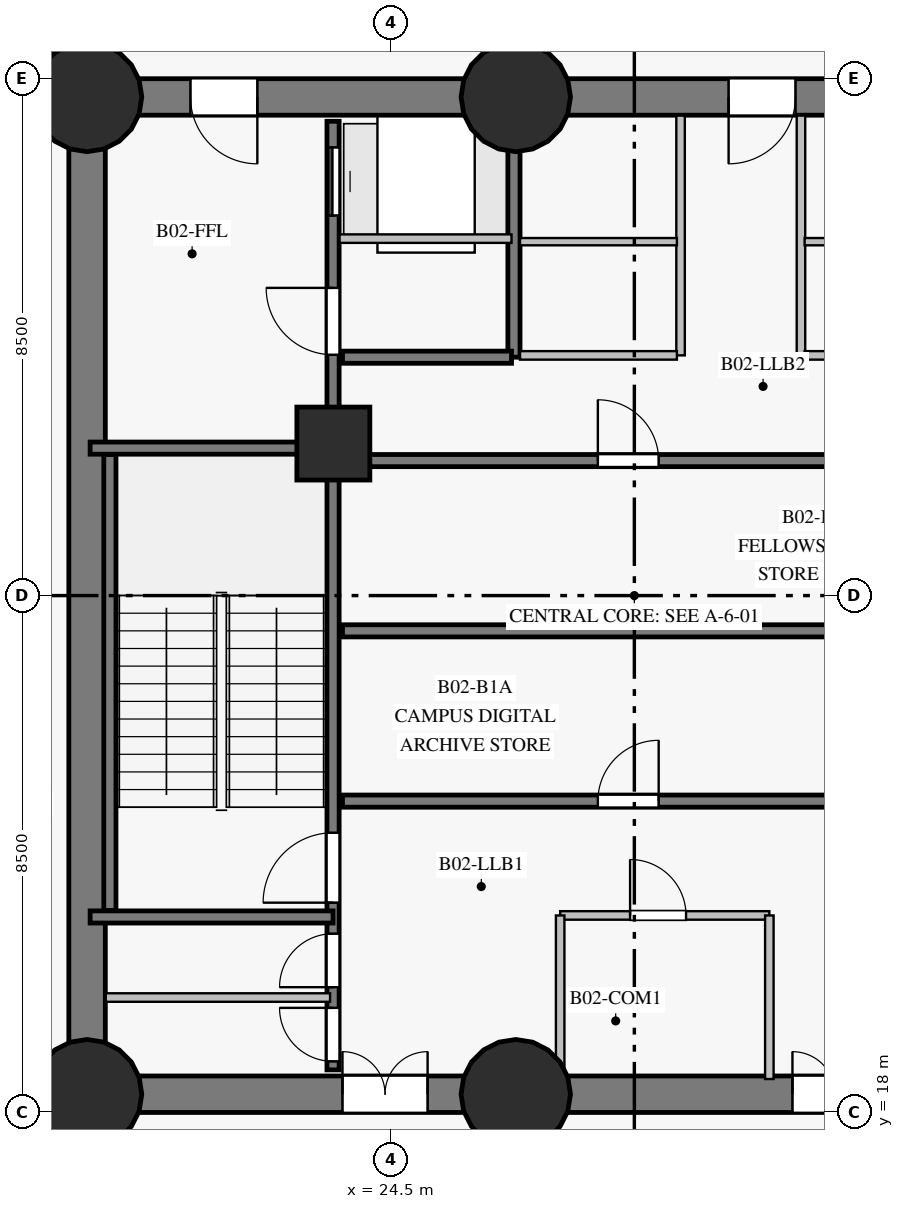
"""IFC4 building model, lengths in metres.
Left out: names, types, materials, properties, quantities, classifications, styles, units other than length and angle.
Written with IfcOpenShell. Run it as: python <this file> out.ifc"""

import sys

from ifc_helpers import new_model, si_unit, direction, frame, frame_2d, origin, origin_with_axes, origin_2d, place, context, subcontext, project, spatial, rectangle, circle, extrude, source, transform, mapped, element, fill, save


model = new_model("IFC4")
c1 = context("Model", 3, precision=1e-05, world=origin(), true_north=direction((0.0, 1.0)))
c2 = subcontext(c1, "Body", "Model", "MODEL_VIEW")
j1 = project(units=[si_unit("LENGTHUNIT", "METRE"), si_unit("PLANEANGLEUNIT", "RADIAN")], contexts=[c1])
p1 = place(None, origin())
s1 = spatial("IfcSite", under=j1, at=p1, CompositionType="ELEMENT")
p2 = place(p1, origin())
s2 = spatial("IfcBuilding", under=s1, at=p2, CompositionType="ELEMENT")
p3 = place(p2, frame((0.0, 0.0, -8.4)))
s3 = spatial("IfcBuildingStorey", under=s2, at=p3, CompositionType="ELEMENT", Elevation=-8.4)
p4 = place(p3, frame((19.5, 18.3, 0.0), z_axis=(0.0, 0.0, 1.0), x_axis=(1.0, 0.0, 0.0)))
e1 = element("IfcWall", 1, at=p4, inside=s3, PredefinedType="SHEAR", context=c2, shape_type="SweptSolid", body=[
    extrude(rectangle(XDim=7.05, YDim=0.6, at=frame_2d((3.525, 0.0))), origin(), (0.0, 0.0, 1.0), 3.85),
])
p5 = place(p4, frame((4.2, 0.0, 0.0)))
e2 = element("IfcOpeningElement", 2, at=p5, cuts=e1, PredefinedType="OPENING", context=c2, shape_type="SweptSolid", body=[
    extrude(rectangle(XDim=1.4, YDim=2.2, at=frame_2d((0.7, 1.1))), frame((0.0, 0.31, 0.0), z_axis=(0.0, -1.0, 0.0), x_axis=(1.0, 0.0, 0.0)), (0.0, 0.0, 1.0), 0.62),
])
p6 = place(p3, frame((26.55, 18.3, 0.0), z_axis=(0.0, 0.0, 1.0), x_axis=(1.0, 0.0, 0.0)))
e3 = element("IfcWall", 3, at=p6, inside=s3, PredefinedType="SHEAR", context=c2, shape_type="SweptSolid", body=[
    extrude(rectangle(XDim=10.95, YDim=0.6, at=frame_2d((5.475, 0.0))), origin(), (0.0, 0.0, 1.0), 3.85),
])
p7 = place(p6, frame((4.55, 0.0, 0.0)))
e4 = element("IfcOpeningElement", 4, at=p7, cuts=e3, PredefinedType="OPENING", context=c2, shape_type="SweptSolid", body=[
    extrude(rectangle(XDim=1.4, YDim=2.2, at=frame_2d((0.7, 1.1))), frame((0.0, 0.31, 0.0), z_axis=(0.0, -1.0, 0.0), x_axis=(1.0, 0.0, 0.0)), (0.0, 0.0, 1.0), 0.62),
])
p8 = place(p3, frame((37.5, 34.7, 0.0), z_axis=(0.0, 0.0, 1.0), x_axis=(-1.0, 0.0, 0.0)))
e5 = element("IfcWall", 5, at=p8, inside=s3, PredefinedType="SHEAR", context=c2, shape_type="SweptSolid", body=[
    extrude(rectangle(XDim=10.95, YDim=0.6, at=frame_2d((5.475, 0.0))), origin(), (0.0, 0.0, 1.0), 3.85),
])
p9 = place(p8, frame((2.15, 0.0, 0.0)))
e6 = element("IfcOpeningElement", 6, at=p9, cuts=e5, PredefinedType="OPENING", context=c2, shape_type="SweptSolid", body=[
    extrude(rectangle(XDim=1.2, YDim=2.15, at=frame_2d((0.6, 1.075))), frame((0.0, 0.31, 0.0), z_axis=(0.0, -1.0, 0.0), x_axis=(1.0, 0.0, 0.0)), (0.0, 0.0, 1.0), 0.62),
])
p10 = place(p8, frame((6.35, 0.0, 0.0)))
e7 = element("IfcOpeningElement", 7, at=p10, cuts=e5, PredefinedType="OPENING", context=c2, shape_type="SweptSolid", body=[
    extrude(rectangle(XDim=1.1, YDim=2.15, at=frame_2d((0.55, 1.075))), frame((0.0, 0.31, 0.0), z_axis=(0.0, -1.0, 0.0), x_axis=(1.0, 0.0, 0.0)), (0.0, 0.0, 1.0), 0.62),
])
p11 = place(p3, frame((26.55, 34.7, 0.0), z_axis=(0.0, 0.0, 1.0), x_axis=(-1.0, 0.0, 0.0)))
e8 = element("IfcWall", 8, at=p11, inside=s3, PredefinedType="SHEAR", context=c2, shape_type="SweptSolid", body=[
    extrude(rectangle(XDim=7.05, YDim=0.6, at=frame_2d((3.525, 0.0))), origin(), (0.0, 0.0, 1.0), 3.85),
])
p12 = place(p11, frame((4.25, 0.0, 0.0)))
e9 = element("IfcOpeningElement", 9, at=p12, cuts=e8, PredefinedType="OPENING", context=c2, shape_type="SweptSolid", body=[
    extrude(rectangle(XDim=1.1, YDim=2.15, at=frame_2d((0.55, 1.075))), frame((0.0, 0.31, 0.0), z_axis=(0.0, -1.0, 0.0), x_axis=(1.0, 0.0, 0.0)), (0.0, 0.0, 1.0), 0.62),
])
p13 = place(p3, frame((19.5, 34.7, 0.0), z_axis=(0.0, 0.0, 1.0), x_axis=(0.0, -1.0, 0.0)))
e10 = element("IfcWall", 10, at=p13, inside=s3, PredefinedType="SHEAR", context=c2, shape_type="SweptSolid", body=[
    extrude(rectangle(XDim=16.4, YDim=0.6, at=frame_2d((8.2, 0.0))), origin(), (0.0, 0.0, 1.0), 3.85),
])
m1 = source(origin_with_axes(), c2, "Body", "SweptSolid", [
    extrude(circle(Radius=0.9, at=origin_2d()), origin(), (0.0, 0.0, 1.0), 4.2),
])
for number, where, z_axis, x_axis in (
    (11, (19.5, 18.3, 0.0), (0.0, 0.0, 1.0), (1.0, 0.0, 0.0)),
    (12, (26.55, 18.3, 0.0), (0.0, 0.0, 1.0), (1.0, 0.0, 0.0)),
    (13, (19.5, 34.7, 0.0), (0.0, 0.0, 1.0), (1.0, 0.0, 0.0)),
    (14, (26.55, 34.7, 0.0), (0.0, 0.0, 1.0), (1.0, 0.0, 0.0)),
):
    element("IfcColumn", number, at=place(p3, frame(where, z_axis=z_axis, x_axis=x_axis)), inside=s3, PredefinedType="COLUMN", context=c2, shape_type="MappedRepresentation", body=[
        mapped(m1, transform((0.0, 0.0, 0.0), scale=1.0)),
    ])
m2 = source(origin_with_axes(), c2, "Body", "SweptSolid", [
    extrude(rectangle(XDim=1.2, YDim=1.2, at=origin_2d()), origin(), (0.0, 0.0, 1.0), 4.2),
])
p14 = place(p3, frame((23.55, 29.0, 0.0), z_axis=(0.0, 0.0, 1.0), x_axis=(1.0, 0.0, 0.0)))
e15 = element("IfcColumn", 15, at=p14, inside=s3, PredefinedType="COLUMN", context=c2, shape_type="MappedRepresentation", body=[
    mapped(m2, transform((0.0, 0.0, 0.0), scale=1.0)),
])
p15 = place(p3, frame((23.545, 18.7, 0.0), z_axis=(0.0, 0.0, 1.0), x_axis=(0.0, 1.0, 0.0)))
e16 = element("IfcWall", 16, at=p15, inside=s3, PredefinedType="SHEAR", context=c2, shape_type="SweptSolid", body=[
    extrude(rectangle(XDim=15.6, YDim=0.2, at=frame_2d((7.8, 0.0))), origin(), (0.0, 0.0, 1.0), 3.85),
])
p16 = place(p15, frame((2.75, 0.0, 0.0)))
e17 = element("IfcOpeningElement", 17, at=p16, cuts=e16, PredefinedType="OPENING", context=c2, shape_type="SweptSolid", body=[
    extrude(rectangle(XDim=1.15, YDim=2.15, at=frame_2d((0.575, 1.075))), frame((0.0, 0.11, 0.0), z_axis=(0.0, -1.0, 0.0), x_axis=(1.0, 0.0, 0.0)), (0.0, 0.0, 1.0), 0.22),
])
p17 = place(p15, frame((11.76, 0.0, 0.0)))
e18 = element("IfcOpeningElement", 18, at=p17, cuts=e16, PredefinedType="OPENING", context=c2, shape_type="SweptSolid", body=[
    extrude(rectangle(XDim=1.1, YDim=2.15, at=frame_2d((0.55, 1.075))), frame((0.0, 0.11, 0.0), z_axis=(0.0, -1.0, 0.0), x_axis=(1.0, 0.0, 0.0)), (0.0, 0.0, 1.0), 0.22),
])
p18 = place(p15, frame((0.14, 0.0, 0.0)))
e19 = element("IfcOpeningElement", 19, at=p18, cuts=e16, PredefinedType="OPENING", context=c2, shape_type="SweptSolid", body=[
    extrude(rectangle(XDim=0.88, YDim=2.1, at=frame_2d((0.44, 1.05))), frame((0.0, 0.11, 0.0), z_axis=(0.0, -1.0, 0.0), x_axis=(1.0, 0.0, 0.0)), (0.0, 0.0, 1.0), 0.22),
])
p19 = place(p15, frame((1.36, 0.0, 0.0)))
e20 = element("IfcOpeningElement", 20, at=p19, cuts=e16, PredefinedType="OPENING", context=c2, shape_type="SweptSolid", body=[
    extrude(rectangle(XDim=0.88, YDim=2.1, at=frame_2d((0.44, 1.05))), frame((0.0, 0.11, 0.0), z_axis=(0.0, -1.0, 0.0), x_axis=(1.0, 0.0, 0.0)), (0.0, 0.0, 1.0), 0.22),
])
p20 = place(p15, frame((14.05, 0.0, 0.0)))
e21 = element("IfcOpeningElement", 21, at=p20, cuts=e16, PredefinedType="OPENING", context=c2, shape_type="SweptSolid", body=[
    extrude(rectangle(XDim=1.12, YDim=2.15, at=frame_2d((0.56, 1.075))), frame((0.0, 0.11, 0.0), z_axis=(0.0, -1.0, 0.0), x_axis=(1.0, 0.0, 0.0)), (0.0, 0.0, 1.0), 0.22),
])
p21 = place(p3, frame((23.7, 23.12, 0.0), z_axis=(0.0, 0.0, 1.0), x_axis=(1.0, 0.0, 0.0)))
e22 = element("IfcWall", 22, at=p21, inside=s3, PredefinedType="SHEAR", context=c2, shape_type="SweptSolid", body=[
    extrude(rectangle(XDim=9.6, YDim=0.2, at=frame_2d((4.8, 0.0))), origin(), (0.0, 0.0, 1.0), 3.85),
])
p22 = place(p21, frame((4.2, 0.0, 0.0)))
e23 = element("IfcOpeningElement", 23, at=p22, cuts=e22, PredefinedType="OPENING", context=c2, shape_type="SweptSolid", body=[
    extrude(rectangle(XDim=1.0, YDim=2.15, at=frame_2d((0.5, 1.075))), frame((0.0, 0.11, 0.0), z_axis=(0.0, -1.0, 0.0), x_axis=(1.0, 0.0, 0.0)), (0.0, 0.0, 1.0), 0.22),
])
p23 = place(p3, frame((23.7, 25.92, 0.0), z_axis=(0.0, 0.0, 1.0), x_axis=(1.0, 0.0, 0.0)))
e24 = element("IfcWall", 24, at=p23, inside=s3, PredefinedType="SHEAR", context=c2, shape_type="SweptSolid", body=[
    extrude(rectangle(XDim=9.6, YDim=0.2, at=frame_2d((4.8, 0.0))), origin(), (0.0, 0.0, 1.0), 3.85),
])
p24 = place(p3, frame((23.7, 28.72, 0.0), z_axis=(0.0, 0.0, 1.0), x_axis=(1.0, 0.0, 0.0)))
e25 = element("IfcWall", 25, at=p24, inside=s3, PredefinedType="SHEAR", context=c2, shape_type="SweptSolid", body=[
    extrude(rectangle(XDim=9.6, YDim=0.2, at=frame_2d((4.8, 0.0))), origin(), (0.0, 0.0, 1.0), 3.85),
])
p25 = place(p24, frame((4.2, 0.0, 0.0)))
e26 = element("IfcOpeningElement", 26, at=p25, cuts=e25, PredefinedType="OPENING", context=c2, shape_type="SweptSolid", body=[
    extrude(rectangle(XDim=1.0, YDim=2.15, at=frame_2d((0.5, 1.075))), frame((0.0, 0.11, 0.0), z_axis=(0.0, -1.0, 0.0), x_axis=(1.0, 0.0, 0.0)), (0.0, 0.0, 1.0), 0.22),
])
p26 = place(p3, frame((19.875, 21.32, 0.0), z_axis=(0.0, 0.0, 1.0), x_axis=(0.0, 1.0, 0.0)))
e27 = element("IfcWall", 27, at=p26, inside=s3, PredefinedType="SHEAR", context=c2, shape_type="SweptSolid", body=[
    extrude(rectangle(XDim=7.5, YDim=0.2, at=frame_2d((3.75, 0.0))), origin(), (0.0, 0.0, 1.0), 3.85),
])
for number, where, z_axis, x_axis in (
    (28, (19.55, 21.215, 0.0), (0.0, 0.0, 1.0), (1.0, 0.0, 0.0)),
    (29, (19.55, 28.925, 0.0), (0.0, 0.0, 1.0), (1.0, 0.0, 0.0)),
):
    element("IfcWall", number, at=place(p3, frame(where, z_axis=z_axis, x_axis=x_axis)), inside=s3, PredefinedType="SHEAR", context=c2, shape_type="SweptSolid", body=[
        extrude(rectangle(XDim=3.995, YDim=0.2, at=frame_2d((1.998, 0.0))), origin(), (0.0, 0.0, 1.0), 3.85),
    ])
p27 = place(p3, frame((26.52, 30.42, 0.0), z_axis=(0.0, 0.0, 1.0), x_axis=(0.0, 1.0, 0.0)))
e30 = element("IfcWall", 30, at=p27, inside=s3, PredefinedType="SHEAR", context=c2, shape_type="SweptSolid", body=[
    extrude(rectangle(XDim=3.86, YDim=0.2, at=frame_2d((1.93, 0.0))), origin(), (0.0, 0.0, 1.0), 3.85),
])
p28 = place(p3, frame((23.7, 30.42, 0.0), z_axis=(0.0, 0.0, 1.0), x_axis=(1.0, 0.0, 0.0)))
e31 = element("IfcWall", 31, at=p28, inside=s3, PredefinedType="SHEAR", context=c2, shape_type="SweptSolid", body=[
    extrude(rectangle(XDim=2.78, YDim=0.2, at=frame_2d((1.39, 0.0))), origin(), (0.0, 0.0, 1.0), 3.85),
])
for number, where, z_axis, x_axis in (
    (32, (29.26, 30.45, 0.0), (0.0, 0.0, 1.0), (0.0, 1.0, 0.0)),
    (33, (31.24, 30.45, 0.0), (0.0, 0.0, 1.0), (0.0, 1.0, 0.0)),
):
    element("IfcWall", number, at=place(p3, frame(where, z_axis=z_axis, x_axis=x_axis)), inside=s3, PredefinedType="PARTITIONING", context=c2, shape_type="SweptSolid", body=[
        extrude(rectangle(XDim=3.943, YDim=0.14, at=frame_2d((1.972, 0.0))), origin(), (0.0, 0.0, 1.0), 3.85),
    ])
p29 = place(p3, frame((19.807, 19.89, 0.0), z_axis=(0.0, 0.0, 1.0), x_axis=(1.0, 0.0, 0.0)))
e34 = element("IfcWall", 34, at=p29, inside=s3, PredefinedType="PARTITIONING", context=c2, shape_type="SweptSolid", body=[
    extrude(rectangle(XDim=3.689, YDim=0.14, at=frame_2d((1.844, 0.0))), origin(), (0.0, 0.0, 1.0), 3.85),
])
p30 = place(p3, frame((27.28, 21.24, 0.0), z_axis=(0.0, 0.0, 1.0), x_axis=(1.0, 0.0, 0.0)))
e35 = element("IfcWall", 35, at=p30, inside=s3, PredefinedType="PARTITIONING", context=c2, shape_type="SweptSolid", body=[
    extrude(rectangle(XDim=3.44, YDim=0.14, at=frame_2d((1.72, 0.0))), origin(), (0.0, 0.0, 1.0), 3.85),
])
p31 = place(p30, frame((1.15, 0.0, 0.0)))
e36 = element("IfcOpeningElement", 36, at=p31, cuts=e35, PredefinedType="OPENING", context=c2, shape_type="SweptSolid", body=[
    extrude(rectangle(XDim=0.92, YDim=2.1, at=frame_2d((0.46, 1.05))), frame((0.0, 0.08, 0.0), z_axis=(0.0, -1.0, 0.0), x_axis=(1.0, 0.0, 0.0)), (0.0, 0.0, 1.0), 0.16),
])
p32 = place(p3, frame((23.652, 32.37, 0.0), z_axis=(0.0, 0.0, 1.0), x_axis=(1.0, 0.0, 0.0)))
e37 = element("IfcWall", 37, at=p32, inside=s3, PredefinedType="PARTITIONING", context=c2, shape_type="SweptSolid", body=[
    extrude(rectangle(XDim=2.828, YDim=0.14, at=frame_2d((1.414, 0.0))), origin(), (0.0, 0.0, 1.0), 3.85),
])
for number, where, z_axis, x_axis in (
    (38, (27.28, 18.55, 0.0), (0.0, 0.0, 1.0), (0.0, 1.0, 0.0)),
    (39, (30.72, 18.55, 0.0), (0.0, 0.0, 1.0), (0.0, 1.0, 0.0)),
):
    element("IfcWall", number, at=place(p3, frame(where, z_axis=z_axis, x_axis=x_axis)), inside=s3, PredefinedType="PARTITIONING", context=c2, shape_type="SweptSolid", body=[
        extrude(rectangle(XDim=2.69, YDim=0.14, at=frame_2d((1.345, 0.0))), origin(), (0.0, 0.0, 1.0), 3.85),
    ])
p33 = place(p3, frame((26.62, 30.45, 0.0), z_axis=(0.0, 0.0, 1.0), x_axis=(1.0, 0.0, 0.0)))
e40 = element("IfcWall", 40, at=p33, inside=s3, PredefinedType="PARTITIONING", context=c2, shape_type="SweptSolid", body=[
    extrude(rectangle(XDim=2.58, YDim=0.14, at=frame_2d((1.29, 0.0))), origin(), (0.0, 0.0, 1.0), 3.85),
])
p34 = place(p3, frame((26.62, 32.32, 0.0), z_axis=(0.0, 0.0, 1.0), x_axis=(1.0, 0.0, 0.0)))
e41 = element("IfcWall", 41, at=p34, inside=s3, PredefinedType="PARTITIONING", context=c2, shape_type="SweptSolid", body=[
    extrude(rectangle(XDim=2.58, YDim=0.12, at=frame_2d((1.29, 0.0))), origin(), (0.0, 0.0, 1.0), 3.85),
])
p35 = place(p3, frame((31.3, 30.45, 0.0), z_axis=(0.0, 0.0, 1.0), x_axis=(1.0, 0.0, 0.0)))
e42 = element("IfcWall", 42, at=p35, inside=s3, PredefinedType="PARTITIONING", context=c2, shape_type="SweptSolid", body=[
    extrude(rectangle(XDim=2.075, YDim=0.14, at=frame_2d((1.038, 0.0))), origin(), (0.0, 0.0, 1.0), 3.85),
])
p36 = place(p3, frame((31.3, 32.32, 0.0), z_axis=(0.0, 0.0, 1.0), x_axis=(1.0, 0.0, 0.0)))
e43 = element("IfcWall", 43, at=p36, inside=s3, PredefinedType="PARTITIONING", context=c2, shape_type="SweptSolid", body=[
    extrude(rectangle(XDim=2.075, YDim=0.12, at=frame_2d((1.038, 0.0))), origin(), (0.0, 0.0, 1.0), 3.85),
])
m3 = source(origin_with_axes(), c2, "Body", "SweptSolid", [
    extrude(rectangle(XDim=1.15, YDim=2.15, at=frame_2d((0.575, 1.075))), frame((0.0, 0.025, 0.0), z_axis=(0.0, -1.0, 0.0), x_axis=(1.0, 0.0, 0.0)), (0.0, 0.0, 1.0), 0.05),
])
p37 = place(p16, origin())
e44 = element("IfcDoor", 44, at=p37, inside=s3, OperationType="SINGLE_SWING_LEFT", PredefinedType="DOOR", context=c2, shape_type="MappedRepresentation", body=[
    mapped(m3, transform((0.0, 0.0, 0.0), scale=1.0)),
])
fill(e17, e44)
m4 = source(origin_with_axes(), c2, "Body", "SweptSolid", [
    extrude(rectangle(XDim=1.1, YDim=2.15, at=frame_2d((0.55, 1.075))), frame((0.0, 0.025, 0.0), z_axis=(0.0, -1.0, 0.0), x_axis=(1.0, 0.0, 0.0)), (0.0, 0.0, 1.0), 0.05),
])
p38 = place(p12, origin())
e45 = element("IfcDoor", 45, at=p38, inside=s3, OperationType="SINGLE_SWING_LEFT", PredefinedType="DOOR", context=c2, shape_type="MappedRepresentation", body=[
    mapped(m4, transform((0.0, 0.0, 0.0), scale=1.0)),
])
fill(e9, e45)
p39 = place(p17, origin())
e46 = element("IfcDoor", 46, at=p39, inside=s3, OperationType="SINGLE_SWING_RIGHT", PredefinedType="DOOR", context=c2, shape_type="MappedRepresentation", body=[
    mapped(m4, transform((0.0, 0.0, 0.0), scale=1.0)),
])
fill(e18, e46)
m5 = source(origin_with_axes(), c2, "Body", "SweptSolid", [
    extrude(rectangle(XDim=0.88, YDim=2.1, at=frame_2d((0.44, 1.05))), frame((0.0, 0.025, 0.0), z_axis=(0.0, -1.0, 0.0), x_axis=(1.0, 0.0, 0.0)), (0.0, 0.0, 1.0), 0.05),
])
p40 = place(p18, origin())
e47 = element("IfcDoor", 47, at=p40, inside=s3, OperationType="SINGLE_SWING_RIGHT", PredefinedType="DOOR", context=c2, shape_type="MappedRepresentation", body=[
    mapped(m5, transform((0.0, 0.0, 0.0), scale=1.0)),
])
fill(e19, e47)
p41 = place(p19, origin())
e48 = element("IfcDoor", 48, at=p41, inside=s3, OperationType="SINGLE_SWING_LEFT", PredefinedType="DOOR", context=c2, shape_type="MappedRepresentation", body=[
    mapped(m5, transform((0.0, 0.0, 0.0), scale=1.0)),
])
fill(e20, e48)
m6 = source(origin_with_axes(), c2, "Body", "SweptSolid", [
    extrude(rectangle(XDim=1.4, YDim=2.2, at=frame_2d((0.7, 1.1))), frame((0.0, 0.025, 0.0), z_axis=(0.0, -1.0, 0.0), x_axis=(1.0, 0.0, 0.0)), (0.0, 0.0, 1.0), 0.05),
])
p42 = place(p5, origin())
e49 = element("IfcDoor", 49, at=p42, inside=s3, OperationType="DOUBLE_DOOR_SINGLE_SWING", PredefinedType="DOOR", context=c2, shape_type="MappedRepresentation", body=[
    mapped(m6, transform((0.0, 0.0, 0.0), scale=1.0)),
])
fill(e2, e49)
p43 = place(p7, origin())
e50 = element("IfcDoor", 50, at=p43, inside=s3, OperationType="DOUBLE_DOOR_SINGLE_SWING", PredefinedType="DOOR", context=c2, shape_type="MappedRepresentation", body=[
    mapped(m6, transform((0.0, 0.0, 0.0), scale=1.0)),
])
fill(e4, e50)
m7 = source(origin_with_axes(), c2, "Body", "SweptSolid", [
    extrude(rectangle(XDim=0.92, YDim=2.1, at=frame_2d((0.46, 1.05))), frame((0.0, 0.025, 0.0), z_axis=(0.0, -1.0, 0.0), x_axis=(1.0, 0.0, 0.0)), (0.0, 0.0, 1.0), 0.05),
])
p44 = place(p31, origin())
e51 = element("IfcDoor", 51, at=p44, inside=s3, OperationType="SINGLE_SWING_LEFT", PredefinedType="DOOR", context=c2, shape_type="MappedRepresentation", body=[
    mapped(m7, transform((0.0, 0.0, 0.0), scale=1.0)),
])
fill(e36, e51)
m8 = source(origin_with_axes(), c2, "Body", "SweptSolid", [
    extrude(rectangle(XDim=1.0, YDim=2.15, at=frame_2d((0.5, 1.075))), frame((0.0, 0.025, 0.0), z_axis=(0.0, -1.0, 0.0), x_axis=(1.0, 0.0, 0.0)), (0.0, 0.0, 1.0), 0.05),
])
p45 = place(p22, origin())
e52 = element("IfcDoor", 52, at=p45, inside=s3, OperationType="SINGLE_SWING_RIGHT", PredefinedType="DOOR", context=c2, shape_type="MappedRepresentation", body=[
    mapped(m8, transform((0.0, 0.0, 0.0), scale=1.0)),
])
fill(e23, e52)
p46 = place(p25, origin())
e53 = element("IfcDoor", 53, at=p46, inside=s3, OperationType="SINGLE_SWING_LEFT", PredefinedType="DOOR", context=c2, shape_type="MappedRepresentation", body=[
    mapped(m8, transform((0.0, 0.0, 0.0), scale=1.0)),
])
fill(e26, e53)
p47 = place(p10, origin())
e54 = element("IfcDoor", 54, at=p47, inside=s3, OperationType="SINGLE_SWING_RIGHT", PredefinedType="DOOR", context=c2, shape_type="MappedRepresentation", body=[
    mapped(m4, transform((0.0, 0.0, 0.0), scale=1.0)),
])
fill(e7, e54)
m9 = source(origin_with_axes(), c2, "Body", "SweptSolid", [
    extrude(rectangle(XDim=1.12, YDim=2.15, at=frame_2d((0.56, 1.075))), frame((0.0, 0.025, 0.0), z_axis=(0.0, -1.0, 0.0), x_axis=(1.0, 0.0, 0.0)), (0.0, 0.0, 1.0), 0.05),
])
p48 = place(p20, origin())
e55 = element("IfcDoor", 55, at=p48, inside=s3, OperationType="SLIDING_TO_RIGHT", PredefinedType="DOOR", context=c2, shape_type="MappedRepresentation", body=[
    mapped(m9, transform((0.0, 0.0, 0.0), scale=1.0)),
])
fill(e21, e55)
save(model, sys.argv[1])
